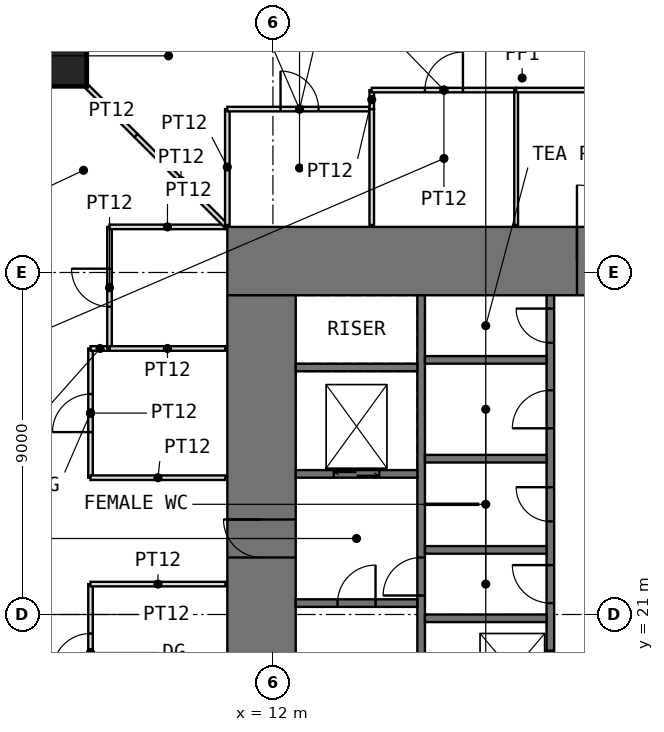
"""IFC4 building model, lengths in metres.
Left out: names, types, materials, properties, quantities, classifications, styles, units other than length and angle.
Written with IfcOpenShell. Run it as: python <this file> out.ifc"""

import sys

from ifc_helpers import new_model, si_unit, direction, frame, frame_2d, origin, origin_2d, place, context, subcontext, project, spatial, rectangle, extrude, element, fill, save


model = new_model("IFC4")
c1 = context("Model", 3, precision=1e-05, world=origin(), true_north=direction((0.0, 1.0)))
c2 = subcontext(c1, "Body", "Model", "MODEL_VIEW")
j1 = project(units=[si_unit("LENGTHUNIT", "METRE"), si_unit("PLANEANGLEUNIT", "RADIAN")], contexts=[c1])
p1 = place(None, origin())
s1 = spatial("IfcSite", under=j1, at=p1, CompositionType="ELEMENT")
p2 = place(p1, origin())
s2 = spatial("IfcBuilding", under=s1, at=p2, CompositionType="ELEMENT")
p3 = place(p2, frame((0.0, 0.0, 26.5)))
s3 = spatial("IfcBuildingStorey", under=s2, at=p3, CompositionType="ELEMENT", Elevation=26.5)
p4 = place(p3, frame((6.55, 35.45, 0.0), z_axis=(0.0, 0.0, 1.0), x_axis=(1.0, 0.0, 0.0)))
e1 = element("IfcColumn", 1, at=p4, inside=s3, PredefinedType="COLUMN", context=c2, shape_type="SweptSolid", body=[
    extrude(rectangle(XDim=1.1, YDim=1.1, at=origin_2d()), origin(), (0.0, 0.0, 1.0), 4.0),
])
p5 = place(p3, frame((10.8, 30.3, -0.05), z_axis=(0.0, 0.0, 1.0), x_axis=(1.0, 0.0, 0.0)))
e2 = element("IfcWall", 2, at=p5, inside=s3, PredefinedType="SHEAR", context=c2, shape_type="SweptSolid", body=[
    extrude(rectangle(XDim=20.4, YDim=1.8, at=frame_2d((10.2, 0.0))), origin(), (0.0, 0.0, 1.0), 4.0),
])
p6 = place(p5, frame((9.2, 0.0, 0.05)))
e3 = element("IfcOpeningElement", 3, at=p6, cuts=e2, PredefinedType="OPENING", context=c2, shape_type="SweptSolid", body=[
    extrude(rectangle(XDim=2.0, YDim=2.2, at=frame_2d((1.0, 1.1))), frame((0.0, 0.91, 0.0), z_axis=(0.0, -1.0, 0.0), x_axis=(1.0, 0.0, 0.0)), (0.0, 0.0, 1.0), 1.82),
])
p7 = place(p3, frame((11.7, 12.6, -0.05), z_axis=(0.0, 0.0, 1.0), x_axis=(0.0, 1.0, 0.0)))
e4 = element("IfcWall", 4, at=p7, inside=s3, PredefinedType="SHEAR", context=c2, shape_type="SweptSolid", body=[
    extrude(rectangle(XDim=16.8, YDim=1.8, at=frame_2d((8.4, 0.0))), origin(), (0.0, 0.0, 1.0), 4.0),
])
p8 = place(p7, frame((9.9, 0.0, 0.05)))
e5 = element("IfcOpeningElement", 5, at=p8, cuts=e4, PredefinedType="OPENING", context=c2, shape_type="SweptSolid", body=[
    extrude(rectangle(XDim=1.0, YDim=2.2, at=frame_2d((0.5, 1.1))), frame((0.0, 0.91, 0.0), z_axis=(0.0, -1.0, 0.0), x_axis=(1.0, 0.0, 0.0)), (0.0, 0.0, 1.0), 1.82),
])
p9 = place(p3, frame((15.9, 12.6, -0.05), z_axis=(0.0, 0.0, 1.0), x_axis=(0.0, 1.0, 0.0)))
e6 = element("IfcWall", 6, at=p9, inside=s3, PredefinedType="SHEAR", context=c2, shape_type="SweptSolid", body=[
    extrude(rectangle(XDim=16.8, YDim=0.2, at=frame_2d((8.4, 0.0))), origin(), (0.0, 0.0, 1.0), 4.0),
])
p10 = place(p9, frame((8.9, 0.0, 0.05)))
e7 = element("IfcOpeningElement", 7, at=p10, cuts=e6, PredefinedType="OPENING", context=c2, shape_type="SweptSolid", body=[
    extrude(rectangle(XDim=1.0, YDim=2.2, at=frame_2d((0.5, 1.1))), frame((0.0, 0.11, 0.0), z_axis=(0.0, -1.0, 0.0), x_axis=(1.0, 0.0, 0.0)), (0.0, 0.0, 1.0), 0.22),
])
p11 = place(p3, frame((19.3, 12.6, -0.05), z_axis=(0.0, 0.0, 1.0), x_axis=(0.0, 1.0, 0.0)))
e8 = element("IfcWall", 8, at=p11, inside=s3, PredefinedType="SHEAR", context=c2, shape_type="SweptSolid", body=[
    extrude(rectangle(XDim=16.8, YDim=0.2, at=frame_2d((8.4, 0.0))), origin(), (0.0, 0.0, 1.0), 4.0),
])
p12 = place(p11, frame((8.7, 0.0, 0.05)))
e9 = element("IfcOpeningElement", 9, at=p12, cuts=e8, PredefinedType="OPENING", context=c2, shape_type="SweptSolid", body=[
    extrude(rectangle(XDim=1.0, YDim=2.2, at=frame_2d((0.5, 1.1))), frame((0.0, 0.11, 0.0), z_axis=(0.0, -1.0, 0.0), x_axis=(1.0, 0.0, 0.0)), (0.0, 0.0, 1.0), 0.22),
])
p13 = place(p11, frame((10.85, 0.0, 0.05)))
e10 = element("IfcOpeningElement", 10, at=p13, cuts=e8, PredefinedType="OPENING", context=c2, shape_type="SweptSolid", body=[
    extrude(rectangle(XDim=0.9, YDim=2.2, at=frame_2d((0.45, 1.1))), frame((0.0, 0.11, 0.0), z_axis=(0.0, -1.0, 0.0), x_axis=(1.0, 0.0, 0.0)), (0.0, 0.0, 1.0), 0.22),
])
p14 = place(p11, frame((13.3, 0.0, 0.05)))
e11 = element("IfcOpeningElement", 11, at=p14, cuts=e8, PredefinedType="OPENING", context=c2, shape_type="SweptSolid", body=[
    extrude(rectangle(XDim=1.0, YDim=2.2, at=frame_2d((0.5, 1.1))), frame((0.0, 0.11, 0.0), z_axis=(0.0, -1.0, 0.0), x_axis=(1.0, 0.0, 0.0)), (0.0, 0.0, 1.0), 0.22),
])
p15 = place(p11, frame((15.55, 0.0, 0.05)))
e12 = element("IfcOpeningElement", 12, at=p15, cuts=e8, PredefinedType="OPENING", context=c2, shape_type="SweptSolid", body=[
    extrude(rectangle(XDim=0.9, YDim=2.2, at=frame_2d((0.45, 1.1))), frame((0.0, 0.11, 0.0), z_axis=(0.0, -1.0, 0.0), x_axis=(1.0, 0.0, 0.0)), (0.0, 0.0, 1.0), 0.22),
])
p16 = place(p11, frame((0.75, 0.0, 0.05)))
e13 = element("IfcOpeningElement", 13, at=p16, cuts=e8, PredefinedType="OPENING", context=c2, shape_type="SweptSolid", body=[
    extrude(rectangle(XDim=1.1, YDim=2.2, at=frame_2d((0.55, 1.1))), frame((0.0, 0.11, 0.0), z_axis=(0.0, -1.0, 0.0), x_axis=(1.0, 0.0, 0.0)), (0.0, 0.0, 1.0), 0.22),
])
p17 = place(p11, frame((3.55, 0.0, 0.05)))
e14 = element("IfcOpeningElement", 14, at=p17, cuts=e8, PredefinedType="OPENING", context=c2, shape_type="SweptSolid", body=[
    extrude(rectangle(XDim=1.1, YDim=2.2, at=frame_2d((0.55, 1.1))), frame((0.0, 0.11, 0.0), z_axis=(0.0, -1.0, 0.0), x_axis=(1.0, 0.0, 0.0)), (0.0, 0.0, 1.0), 0.22),
])
p18 = place(p11, frame((6.35, 0.0, 0.05)))
e15 = element("IfcOpeningElement", 15, at=p18, cuts=e8, PredefinedType="OPENING", context=c2, shape_type="SweptSolid", body=[
    extrude(rectangle(XDim=1.1, YDim=2.2, at=frame_2d((0.55, 1.1))), frame((0.0, 0.11, 0.0), z_axis=(0.0, -1.0, 0.0), x_axis=(1.0, 0.0, 0.0)), (0.0, 0.0, 1.0), 0.22),
])
p19 = place(p3, frame((12.6, 21.3, -0.05), z_axis=(0.0, 0.0, 1.0), x_axis=(1.0, 0.0, 0.0)))
e16 = element("IfcWall", 16, at=p19, inside=s3, PredefinedType="SHEAR", context=c2, shape_type="SweptSolid", body=[
    extrude(rectangle(XDim=3.2, YDim=0.2, at=frame_2d((1.6, 0.0))), origin(), (0.0, 0.0, 1.0), 4.0),
])
p20 = place(p19, frame((1.1, 0.0, 0.05)))
e17 = element("IfcOpeningElement", 17, at=p20, cuts=e16, PredefinedType="OPENING", context=c2, shape_type="SweptSolid", body=[
    extrude(rectangle(XDim=1.0, YDim=2.2, at=frame_2d((0.5, 1.1))), frame((0.0, 0.11, 0.0), z_axis=(0.0, -1.0, 0.0), x_axis=(1.0, 0.0, 0.0)), (0.0, 0.0, 1.0), 0.22),
])
p21 = place(p3, frame((12.6, 24.7, -0.05), z_axis=(0.0, 0.0, 1.0), x_axis=(1.0, 0.0, 0.0)))
e18 = element("IfcWall", 18, at=p21, inside=s3, PredefinedType="SHEAR", context=c2, shape_type="SweptSolid", body=[
    extrude(rectangle(XDim=3.2, YDim=0.2, at=frame_2d((1.6, 0.0))), origin(), (0.0, 0.0, 1.0), 4.0),
])
p22 = place(p21, frame((1.0, 0.0, 0.05)))
e19 = element("IfcOpeningElement", 19, at=p22, cuts=e18, PredefinedType="OPENING", context=c2, shape_type="SweptSolid", body=[
    extrude(rectangle(XDim=1.2, YDim=2.2, at=frame_2d((0.6, 1.1))), frame((0.0, 0.11, 0.0), z_axis=(0.0, -1.0, 0.0), x_axis=(1.0, 0.0, 0.0)), (0.0, 0.0, 1.0), 0.22),
])
for number, where, z_axis, x_axis in (
    (20, (12.6, 27.5, -0.05), (0.0, 0.0, 1.0), (1.0, 0.0, 0.0)),
    (21, (16.0, 20.9, -0.05), (0.0, 0.0, 1.0), (1.0, 0.0, 0.0)),
    (22, (16.0, 22.7, -0.05), (0.0, 0.0, 1.0), (1.0, 0.0, 0.0)),
    (23, (16.0, 25.1, -0.05), (0.0, 0.0, 1.0), (1.0, 0.0, 0.0)),
    (24, (16.0, 27.7, -0.05), (0.0, 0.0, 1.0), (1.0, 0.0, 0.0)),
):
    element("IfcWall", number, at=place(p3, frame(where, z_axis=z_axis, x_axis=x_axis)), inside=s3, PredefinedType="SHEAR", context=c2, shape_type="SweptSolid", body=[
        extrude(rectangle(XDim=3.2, YDim=0.2, at=frame_2d((1.6, 0.0))), origin(), (0.0, 0.0, 1.0), 4.0),
    ])
p23 = place(p3, frame((16.0, 23.9, 0.0), z_axis=(0.0, 0.0, 1.0), x_axis=(1.0, 0.0, 0.0)))
e25 = element("IfcWall", 25, at=p23, inside=s3, PredefinedType="PARTITIONING", context=c2, shape_type="SweptSolid", body=[
    extrude(rectangle(XDim=1.4, YDim=0.03, at=frame_2d((0.7, 0.0))), origin(), (0.0, 0.0, 1.0), 3.75),
])
p24 = place(p3, frame((7.11, 34.89, 0.0), z_axis=(0.0, 0.0, 1.0), x_axis=(0.707106781187, -0.707106781187, 0.0)))
e26 = element("IfcWall", 26, at=p24, inside=s3, PredefinedType="PARTITIONING", context=c2, shape_type="SweptSolid", body=[
    extrude(rectangle(XDim=1.822, YDim=0.12, at=frame_2d((0.911, 0.0))), origin(), (0.0, 0.0, 1.0), 3.75),
])
p25 = place(p3, frame((7.2, 14.6, 0.0), z_axis=(0.0, 0.0, 1.0), x_axis=(0.0, 1.0, 0.0)))
e27 = element("IfcWall", 27, at=p25, inside=s3, PredefinedType="PARTITIONING", context=c2, shape_type="SweptSolid", body=[
    extrude(rectangle(XDim=7.2, YDim=0.12, at=frame_2d((3.6, 0.0))), origin(), (0.0, 0.0, 1.0), 3.75),
])
p26 = place(p25, frame((4.9, 0.0, 0.0)))
e28 = element("IfcOpeningElement", 28, at=p26, cuts=e27, PredefinedType="OPENING", context=c2, shape_type="SweptSolid", body=[
    extrude(rectangle(XDim=1.0, YDim=2.4, at=frame_2d((0.5, 1.2))), frame((0.0, 0.07, 0.0), z_axis=(0.0, -1.0, 0.0), x_axis=(1.0, 0.0, 0.0)), (0.0, 0.0, 1.0), 0.14),
])
p27 = place(p3, frame((7.2, 21.8, 0.0), z_axis=(0.0, 0.0, 1.0), x_axis=(1.0, 0.0, 0.0)))
e29 = element("IfcWall", 29, at=p27, inside=s3, PredefinedType="PARTITIONING", context=c2, shape_type="SweptSolid", body=[
    extrude(rectangle(XDim=3.55, YDim=0.12, at=frame_2d((1.775, 0.0))), origin(), (0.0, 0.0, 1.0), 3.75),
])
p28 = place(p3, frame((7.2, 24.6, 0.0), z_axis=(0.0, 0.0, 1.0), x_axis=(0.0, 1.0, 0.0)))
e30 = element("IfcWall", 30, at=p28, inside=s3, PredefinedType="PARTITIONING", context=c2, shape_type="SweptSolid", body=[
    extrude(rectangle(XDim=3.4, YDim=0.12, at=frame_2d((1.7, 0.0))), origin(), (0.0, 0.0, 1.0), 3.75),
])
p29 = place(p28, frame((1.2, 0.0, 0.0)))
e31 = element("IfcOpeningElement", 31, at=p29, cuts=e30, PredefinedType="OPENING", context=c2, shape_type="SweptSolid", body=[
    extrude(rectangle(XDim=1.0, YDim=2.4, at=frame_2d((0.5, 1.2))), frame((0.0, 0.07, 0.0), z_axis=(0.0, -1.0, 0.0), x_axis=(1.0, 0.0, 0.0)), (0.0, 0.0, 1.0), 0.14),
])
p30 = place(p3, frame((7.2, 24.6, 0.0), z_axis=(0.0, 0.0, 1.0), x_axis=(1.0, 0.0, 0.0)))
e32 = element("IfcWall", 32, at=p30, inside=s3, PredefinedType="PARTITIONING", context=c2, shape_type="SweptSolid", body=[
    extrude(rectangle(XDim=3.55, YDim=0.12, at=frame_2d((1.775, 0.0))), origin(), (0.0, 0.0, 1.0), 3.75),
])
p31 = place(p3, frame((7.2, 28.0, 0.0), z_axis=(0.0, 0.0, 1.0), x_axis=(1.0, 0.0, 0.0)))
e33 = element("IfcWall", 33, at=p31, inside=s3, PredefinedType="PARTITIONING", context=c2, shape_type="SweptSolid", body=[
    extrude(rectangle(XDim=0.5, YDim=0.12, at=frame_2d((0.25, 0.0))), origin(), (0.0, 0.0, 1.0), 3.75),
])
p32 = place(p3, frame((7.7, 28.0, 0.0), z_axis=(0.0, 0.0, 1.0), x_axis=(0.0, 1.0, 0.0)))
e34 = element("IfcWall", 34, at=p32, inside=s3, PredefinedType="PARTITIONING", context=c2, shape_type="SweptSolid", body=[
    extrude(rectangle(XDim=3.2, YDim=0.12, at=frame_2d((1.6, 0.0))), origin(), (0.0, 0.0, 1.0), 3.75),
])
p33 = place(p32, frame((1.1, 0.0, 0.0)))
e35 = element("IfcOpeningElement", 35, at=p33, cuts=e34, PredefinedType="OPENING", context=c2, shape_type="SweptSolid", body=[
    extrude(rectangle(XDim=1.0, YDim=2.2, at=frame_2d((0.5, 1.1))), frame((0.0, 0.07, 0.0), z_axis=(0.0, -1.0, 0.0), x_axis=(1.0, 0.0, 0.0)), (0.0, 0.0, 1.0), 0.14),
])
for number, where, z_axis, x_axis in (
    (36, (7.7, 28.0, 0.0), (0.0, 0.0, 1.0), (1.0, 0.0, 0.0)),
    (37, (7.7, 31.2, 0.0), (0.0, 0.0, 1.0), (1.0, 0.0, 0.0)),
):
    element("IfcWall", number, at=place(p3, frame(where, z_axis=z_axis, x_axis=x_axis)), inside=s3, PredefinedType="PARTITIONING", context=c2, shape_type="SweptSolid", body=[
        extrude(rectangle(XDim=3.05, YDim=0.12, at=frame_2d((1.525, 0.0))), origin(), (0.0, 0.0, 1.0), 3.75),
    ])
p34 = place(p3, frame((8.398, 33.602, 0.0), z_axis=(0.0, 0.0, 1.0), x_axis=(0.707106781187, -0.707106781187, 0.0)))
e38 = element("IfcWall", 38, at=p34, inside=s3, PredefinedType="PARTITIONING", context=c2, shape_type="SweptSolid", body=[
    extrude(rectangle(XDim=3.346, YDim=0.12, at=frame_2d((1.673, 0.0))), origin(), (0.0, 0.0, 1.0), 3.75),
])
p35 = place(p3, frame((10.8, 31.25, 0.0), z_axis=(0.0, 0.0, 1.0), x_axis=(0.0, 1.0, 0.0)))
e39 = element("IfcWall", 39, at=p35, inside=s3, PredefinedType="PARTITIONING", context=c2, shape_type="SweptSolid", body=[
    extrude(rectangle(XDim=3.05, YDim=0.12, at=frame_2d((1.525, 0.0))), origin(), (0.0, 0.0, 1.0), 3.75),
])
p36 = place(p3, frame((10.8, 34.3, 0.0), z_axis=(0.0, 0.0, 1.0), x_axis=(1.0, 0.0, 0.0)))
e40 = element("IfcWall", 40, at=p36, inside=s3, PredefinedType="PARTITIONING", context=c2, shape_type="SweptSolid", body=[
    extrude(rectangle(XDim=3.8, YDim=0.12, at=frame_2d((1.9, 0.0))), origin(), (0.0, 0.0, 1.0), 3.75),
])
p37 = place(p36, frame((1.4, 0.0, 0.0)))
e41 = element("IfcOpeningElement", 41, at=p37, cuts=e40, PredefinedType="OPENING", context=c2, shape_type="SweptSolid", body=[
    extrude(rectangle(XDim=1.0, YDim=2.2, at=frame_2d((0.5, 1.1))), frame((0.0, 0.07, 0.0), z_axis=(0.0, -1.0, 0.0), x_axis=(1.0, 0.0, 0.0)), (0.0, 0.0, 1.0), 0.14),
])
p38 = place(p3, frame((14.6, 31.25, 0.0), z_axis=(0.0, 0.0, 1.0), x_axis=(0.0, 1.0, 0.0)))
e42 = element("IfcWall", 42, at=p38, inside=s3, PredefinedType="PARTITIONING", context=c2, shape_type="SweptSolid", body=[
    extrude(rectangle(XDim=3.05, YDim=0.12, at=frame_2d((1.525, 0.0))), origin(), (0.0, 0.0, 1.0), 3.75),
])
p39 = place(p3, frame((14.6, 34.3, 0.0), z_axis=(0.0, 0.0, 1.0), x_axis=(0.0, 1.0, 0.0)))
e43 = element("IfcWall", 43, at=p39, inside=s3, PredefinedType="PARTITIONING", context=c2, shape_type="SweptSolid", body=[
    extrude(rectangle(XDim=0.5, YDim=0.12, at=frame_2d((0.25, 0.0))), origin(), (0.0, 0.0, 1.0), 3.75),
])
p40 = place(p3, frame((14.6, 34.8, 0.0), z_axis=(0.0, 0.0, 1.0), x_axis=(1.0, 0.0, 0.0)))
e44 = element("IfcWall", 44, at=p40, inside=s3, PredefinedType="PARTITIONING", context=c2, shape_type="SweptSolid", body=[
    extrude(rectangle(XDim=3.8, YDim=0.12, at=frame_2d((1.9, 0.0))), origin(), (0.0, 0.0, 1.0), 3.75),
])
p41 = place(p40, frame((1.4, 0.0, 0.0)))
e45 = element("IfcOpeningElement", 45, at=p41, cuts=e44, PredefinedType="OPENING", context=c2, shape_type="SweptSolid", body=[
    extrude(rectangle(XDim=1.0, YDim=2.4, at=frame_2d((0.5, 1.2))), frame((0.0, 0.07, 0.0), z_axis=(0.0, -1.0, 0.0), x_axis=(1.0, 0.0, 0.0)), (0.0, 0.0, 1.0), 0.14),
])
p42 = place(p3, frame((18.4, 31.25, 0.0), z_axis=(0.0, 0.0, 1.0), x_axis=(0.0, 1.0, 0.0)))
e46 = element("IfcWall", 46, at=p42, inside=s3, PredefinedType="PARTITIONING", context=c2, shape_type="SweptSolid", body=[
    extrude(rectangle(XDim=3.55, YDim=0.1, at=frame_2d((1.775, 0.0))), origin(), (0.0, 0.0, 1.0), 3.75),
])
p43 = place(p3, frame((18.4, 34.8, 0.0), z_axis=(0.0, 0.0, 1.0), x_axis=(1.0, 0.0, 0.0)))
e47 = element("IfcWall", 47, at=p43, inside=s3, PredefinedType="PARTITIONING", context=c2, shape_type="SweptSolid", body=[
    extrude(rectangle(XDim=5.2, YDim=0.12, at=frame_2d((2.6, 0.0))), origin(), (0.0, 0.0, 1.0), 3.75),
])
p44 = place(p43, frame((2.1, 0.0, 0.0)))
e48 = element("IfcOpeningElement", 48, at=p44, cuts=e47, PredefinedType="OPENING", context=c2, shape_type="SweptSolid", body=[
    extrude(rectangle(XDim=1.0, YDim=2.4, at=frame_2d((0.5, 1.2))), frame((0.0, 0.07, 0.0), z_axis=(0.0, -1.0, 0.0), x_axis=(1.0, 0.0, 0.0)), (0.0, 0.0, 1.0), 0.14),
])
p45 = place(p6, origin())
e49 = element("IfcDoor", 49, at=p45, inside=s3, OperationType="DOUBLE_DOOR_SINGLE_SWING", PredefinedType="DOOR", context=c2, shape_type="SweptSolid", body=[
    extrude(rectangle(XDim=2.0, YDim=2.2, at=frame_2d((1.0, 1.1))), frame((0.0, 0.025, 0.0), z_axis=(0.0, -1.0, 0.0), x_axis=(1.0, 0.0, 0.0)), (0.0, 0.0, 1.0), 0.05),
])
fill(e3, e49)
p46 = place(p8, origin())
e50 = element("IfcDoor", 50, at=p46, inside=s3, OperationType="SINGLE_SWING_RIGHT", PredefinedType="DOOR", context=c2, shape_type="SweptSolid", body=[
    extrude(rectangle(XDim=1.0, YDim=2.2, at=frame_2d((0.5, 1.1))), frame((0.0, 0.025, 0.0), z_axis=(0.0, -1.0, 0.0), x_axis=(1.0, 0.0, 0.0)), (0.0, 0.0, 1.0), 0.05),
])
fill(e5, e50)
p47 = place(p20, origin())
e51 = element("IfcDoor", 51, at=p47, inside=s3, OperationType="SINGLE_SWING_RIGHT", PredefinedType="DOOR", context=c2, shape_type="SweptSolid", body=[
    extrude(rectangle(XDim=1.0, YDim=2.2, at=frame_2d((0.5, 1.1))), frame((0.0, 0.025, 0.0), z_axis=(0.0, -1.0, 0.0), x_axis=(1.0, 0.0, 0.0)), (0.0, 0.0, 1.0), 0.05),
])
fill(e17, e51)
p48 = place(p10, origin())
e52 = element("IfcDoor", 52, at=p48, inside=s3, OperationType="SINGLE_SWING_LEFT", PredefinedType="DOOR", context=c2, shape_type="SweptSolid", body=[
    extrude(rectangle(XDim=1.0, YDim=2.2, at=frame_2d((0.5, 1.1))), frame((0.0, 0.025, 0.0), z_axis=(0.0, -1.0, 0.0), x_axis=(1.0, 0.0, 0.0)), (0.0, 0.0, 1.0), 0.05),
])
fill(e7, e52)
p49 = place(p12, origin())
e53 = element("IfcDoor", 53, at=p49, inside=s3, OperationType="SINGLE_SWING_RIGHT", PredefinedType="DOOR", context=c2, shape_type="SweptSolid", body=[
    extrude(rectangle(XDim=1.0, YDim=2.2, at=frame_2d((0.5, 1.1))), frame((0.0, 0.025, 0.0), z_axis=(0.0, -1.0, 0.0), x_axis=(1.0, 0.0, 0.0)), (0.0, 0.0, 1.0), 0.05),
])
fill(e9, e53)
p50 = place(p13, origin())
e54 = element("IfcDoor", 54, at=p50, inside=s3, OperationType="SINGLE_SWING_RIGHT", PredefinedType="DOOR", context=c2, shape_type="SweptSolid", body=[
    extrude(rectangle(XDim=0.9, YDim=2.2, at=frame_2d((0.45, 1.1))), frame((0.0, 0.025, 0.0), z_axis=(0.0, -1.0, 0.0), x_axis=(1.0, 0.0, 0.0)), (0.0, 0.0, 1.0), 0.05),
])
fill(e10, e54)
p51 = place(p14, origin())
e55 = element("IfcDoor", 55, at=p51, inside=s3, OperationType="SINGLE_SWING_LEFT", PredefinedType="DOOR", context=c2, shape_type="SweptSolid", body=[
    extrude(rectangle(XDim=1.0, YDim=2.2, at=frame_2d((0.5, 1.1))), frame((0.0, 0.025, 0.0), z_axis=(0.0, -1.0, 0.0), x_axis=(1.0, 0.0, 0.0)), (0.0, 0.0, 1.0), 0.05),
])
fill(e11, e55)
p52 = place(p15, origin())
e56 = element("IfcDoor", 56, at=p52, inside=s3, OperationType="SINGLE_SWING_RIGHT", PredefinedType="DOOR", context=c2, shape_type="SweptSolid", body=[
    extrude(rectangle(XDim=0.9, YDim=2.2, at=frame_2d((0.45, 1.1))), frame((0.0, 0.025, 0.0), z_axis=(0.0, -1.0, 0.0), x_axis=(1.0, 0.0, 0.0)), (0.0, 0.0, 1.0), 0.05),
])
fill(e12, e56)
p53 = place(p37, origin())
e57 = element("IfcDoor", 57, at=p53, inside=s3, OperationType="SINGLE_SWING_LEFT", PredefinedType="DOOR", context=c2, shape_type="SweptSolid", body=[
    extrude(rectangle(XDim=1.0, YDim=2.2, at=frame_2d((0.5, 1.1))), frame((0.0, 0.025, 0.0), z_axis=(0.0, -1.0, 0.0), x_axis=(1.0, 0.0, 0.0)), (0.0, 0.0, 1.0), 0.05),
])
fill(e41, e57)
p54 = place(p41, origin())
e58 = element("IfcDoor", 58, at=p54, inside=s3, OperationType="SINGLE_SWING_RIGHT", PredefinedType="DOOR", context=c2, shape_type="SweptSolid", body=[
    extrude(rectangle(XDim=1.0, YDim=2.4, at=frame_2d((0.5, 1.2))), frame((0.0, 0.025, 0.0), z_axis=(0.0, -1.0, 0.0), x_axis=(1.0, 0.0, 0.0)), (0.0, 0.0, 1.0), 0.05),
])
fill(e45, e58)
p55 = place(p29, origin())
e59 = element("IfcDoor", 59, at=p55, inside=s3, OperationType="SINGLE_SWING_LEFT", PredefinedType="DOOR", context=c2, shape_type="SweptSolid", body=[
    extrude(rectangle(XDim=1.0, YDim=2.4, at=frame_2d((0.5, 1.2))), frame((0.0, 0.025, 0.0), z_axis=(0.0, -1.0, 0.0), x_axis=(1.0, 0.0, 0.0)), (0.0, 0.0, 1.0), 0.05),
])
fill(e31, e59)
p56 = place(p33, origin())
e60 = element("IfcDoor", 60, at=p56, inside=s3, OperationType="SINGLE_SWING_RIGHT", PredefinedType="DOOR", context=c2, shape_type="SweptSolid", body=[
    extrude(rectangle(XDim=1.0, YDim=2.2, at=frame_2d((0.5, 1.1))), frame((0.0, 0.025, 0.0), z_axis=(0.0, -1.0, 0.0), x_axis=(1.0, 0.0, 0.0)), (0.0, 0.0, 1.0), 0.05),
])
fill(e35, e60)
p57 = place(p26, origin())
e61 = element("IfcDoor", 61, at=p57, inside=s3, OperationType="SINGLE_SWING_LEFT", PredefinedType="DOOR", context=c2, shape_type="SweptSolid", body=[
    extrude(rectangle(XDim=1.0, YDim=2.4, at=frame_2d((0.5, 1.2))), frame((0.0, 0.025, 0.0), z_axis=(0.0, -1.0, 0.0), x_axis=(1.0, 0.0, 0.0)), (0.0, 0.0, 1.0), 0.05),
])
fill(e28, e61)
p58 = place(p18, origin())
e62 = element("IfcDoor", 62, at=p58, inside=s3, OperationType="DOUBLE_DOOR_SLIDING", PredefinedType="DOOR", context=c2, shape_type="SweptSolid", body=[
    extrude(rectangle(XDim=1.1, YDim=2.2, at=frame_2d((0.55, 1.1))), frame((0.0, 0.025, 0.0), z_axis=(0.0, -1.0, 0.0), x_axis=(1.0, 0.0, 0.0)), (0.0, 0.0, 1.0), 0.05),
])
fill(e15, e62)
p59 = place(p22, origin())
e63 = element("IfcDoor", 63, at=p59, inside=s3, OperationType="DOUBLE_DOOR_SLIDING", PredefinedType="DOOR", context=c2, shape_type="SweptSolid", body=[
    extrude(rectangle(XDim=1.2, YDim=2.2, at=frame_2d((0.6, 1.1))), frame((0.0, 0.025, 0.0), z_axis=(0.0, -1.0, 0.0), x_axis=(1.0, 0.0, 0.0)), (0.0, 0.0, 1.0), 0.05),
])
fill(e19, e63)
save(model, sys.argv[1])
